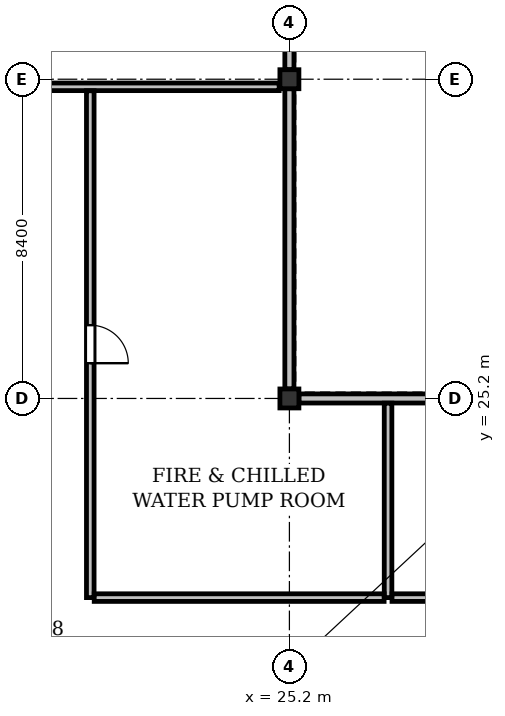
"""IFC4 building model, lengths in metres.
Left out: names, types, materials, properties, quantities, classifications, styles, units other than length and angle.
Written with IfcOpenShell. Run it as: python <this file> out.ifc"""

import sys

from ifc_helpers import new_model, si_unit, direction, frame, frame_2d, origin, origin_2d, place, context, subcontext, project, spatial, rectangle, i_section, extrude, element, fill, save


model = new_model("IFC4")
c1 = context("Model", 3, precision=1e-05, world=origin(), true_north=direction((0.0, 1.0)))
c2 = subcontext(c1, "Body", "Model", "MODEL_VIEW")
j1 = project(units=[si_unit("LENGTHUNIT", "METRE"), si_unit("PLANEANGLEUNIT", "RADIAN")], contexts=[c1])
p1 = place(None, origin())
s1 = spatial("IfcSite", under=j1, at=p1, CompositionType="ELEMENT")
p2 = place(p1, origin())
s2 = spatial("IfcBuilding", under=s1, at=p2, CompositionType="ELEMENT")
p3 = place(p2, frame((0.0, 0.0, 79.4)))
s3 = spatial("IfcBuildingStorey", under=s2, at=p3, CompositionType="ELEMENT", Elevation=79.4)
for number, where, z_axis, x_axis in (
    (1, (25.2, 25.2, 0.0), (0.0, 0.0, 1.0), (1.0, 0.0, 0.0)),
    (2, (25.2, 33.6, 0.0), (0.0, 0.0, 1.0), (1.0, 0.0, 0.0)),
):
    element("IfcColumn", number, at=place(p3, frame(where, z_axis=z_axis, x_axis=x_axis)), inside=s3, PredefinedType="COLUMN", context=c2, shape_type="SweptSolid", body=[
        extrude(i_section(OverallWidth=0.5, OverallDepth=0.5, WebThickness=0.028, FlangeThickness=0.04, at=origin_2d()), origin(), (0.0, 0.0, 1.0), 5.0),
    ])
p4 = place(p3, frame((25.2, 41.75, 0.0), z_axis=(0.0, 0.0, 1.0), x_axis=(0.0, -1.0, 0.0)))
e3 = element("IfcWall", 3, at=p4, inside=s3, PredefinedType="STANDARD", context=c2, shape_type="SweptSolid", body=[
    extrude(rectangle(XDim=7.9, YDim=0.24, at=frame_2d((3.95, 0.0))), origin(), (0.0, 0.0, 1.0), 3.709),
])
p5 = place(p3, frame((25.2, 33.35, 0.0), z_axis=(0.0, 0.0, 1.0), x_axis=(0.0, -1.0, 0.0)))
e4 = element("IfcWall", 4, at=p5, inside=s3, PredefinedType="STANDARD", context=c2, shape_type="SweptSolid", body=[
    extrude(rectangle(XDim=7.9, YDim=0.24, at=frame_2d((3.95, 0.0))), origin(), (0.0, 0.0, 1.0), 3.709),
])
p6 = place(p3, frame((25.45, 25.2, 0.0), z_axis=(0.0, 0.0, 1.0), x_axis=(1.0, 0.0, 0.0)))
e5 = element("IfcWall", 5, at=p6, inside=s3, PredefinedType="STANDARD", context=c2, shape_type="SweptSolid", body=[
    extrude(rectangle(XDim=7.9, YDim=0.24, at=frame_2d((3.95, 0.0))), origin(), (0.0, 0.0, 1.0), 3.825),
])
p7 = place(p3, frame((17.624, 33.4, 0.0), z_axis=(0.0, 0.0, 1.0), x_axis=(1.0, 0.0, 0.0)))
e6 = element("IfcWall", 6, at=p7, inside=s3, PredefinedType="PARTITIONING", context=c2, shape_type="SweptSolid", body=[
    extrude(rectangle(XDim=7.306, YDim=0.2, at=frame_2d((3.653, 0.0))), origin(), (0.0, 0.0, 1.0), 3.825),
])
p8 = place(p3, frame((27.796, 25.076, 0.0), z_axis=(0.0, 0.0, 1.0), x_axis=(0.0, -1.0, 0.0)))
e7 = element("IfcWall", 7, at=p8, inside=s3, PredefinedType="PARTITIONING", context=c2, shape_type="SweptSolid", body=[
    extrude(rectangle(XDim=5.116, YDim=0.2, at=frame_2d((2.558, 0.0))), origin(), (0.0, 0.0, 1.0), 3.825),
])
p9 = place(p3, frame((27.9, 19.96, 0.0), z_axis=(0.0, 0.0, 1.0), x_axis=(1.0, 0.0, 0.0)))
e8 = element("IfcWall", 8, at=p9, inside=s3, PredefinedType="PARTITIONING", context=c2, shape_type="SweptSolid", body=[
    extrude(rectangle(XDim=7.7, YDim=0.2, at=frame_2d((3.85, 0.0))), origin(), (0.0, 0.0, 1.0), 3.709),
])
p10 = place(p3, frame((19.96, 33.296, 0.0), z_axis=(0.0, 0.0, 1.0), x_axis=(0.0, -1.0, 0.0)))
e9 = element("IfcWall", 9, at=p10, inside=s3, PredefinedType="PARTITIONING", context=c2, shape_type="SweptSolid", body=[
    extrude(rectangle(XDim=13.336, YDim=0.2, at=frame_2d((6.668, 0.0))), origin(), (0.0, 0.0, 1.0), 3.825),
])
p11 = place(p10, frame((6.168, 0.0, 0.0)))
e10 = element("IfcOpeningElement", 10, at=p11, cuts=e9, PredefinedType="OPENING", context=c2, shape_type="SweptSolid", body=[
    extrude(rectangle(XDim=1.0, YDim=2.15, at=frame_2d((0.5, 1.075))), frame((0.0, 0.11, 0.0), z_axis=(0.0, -1.0, 0.0), x_axis=(1.0, 0.0, 0.0)), (0.0, 0.0, 1.0), 0.22),
])
p12 = place(p3, frame((20.064, 19.96, 0.0), z_axis=(0.0, 0.0, 1.0), x_axis=(1.0, 0.0, 0.0)))
e11 = element("IfcWall", 11, at=p12, inside=s3, PredefinedType="PARTITIONING", context=c2, shape_type="SweptSolid", body=[
    extrude(rectangle(XDim=7.628, YDim=0.2, at=frame_2d((3.814, 0.0))), origin(), (0.0, 0.0, 1.0), 3.709),
])
p13 = place(p11, origin())
e12 = element("IfcDoor", 12, at=p13, inside=s3, OperationType="SINGLE_SWING_RIGHT", PredefinedType="DOOR", context=c2, shape_type="SweptSolid", body=[
    extrude(rectangle(XDim=1.0, YDim=2.15, at=frame_2d((0.5, 1.075))), frame((0.0, 0.025, 0.0), z_axis=(0.0, -1.0, 0.0), x_axis=(1.0, 0.0, 0.0)), (0.0, 0.0, 1.0), 0.05),
])
fill(e10, e12)
save(model, sys.argv[1])
